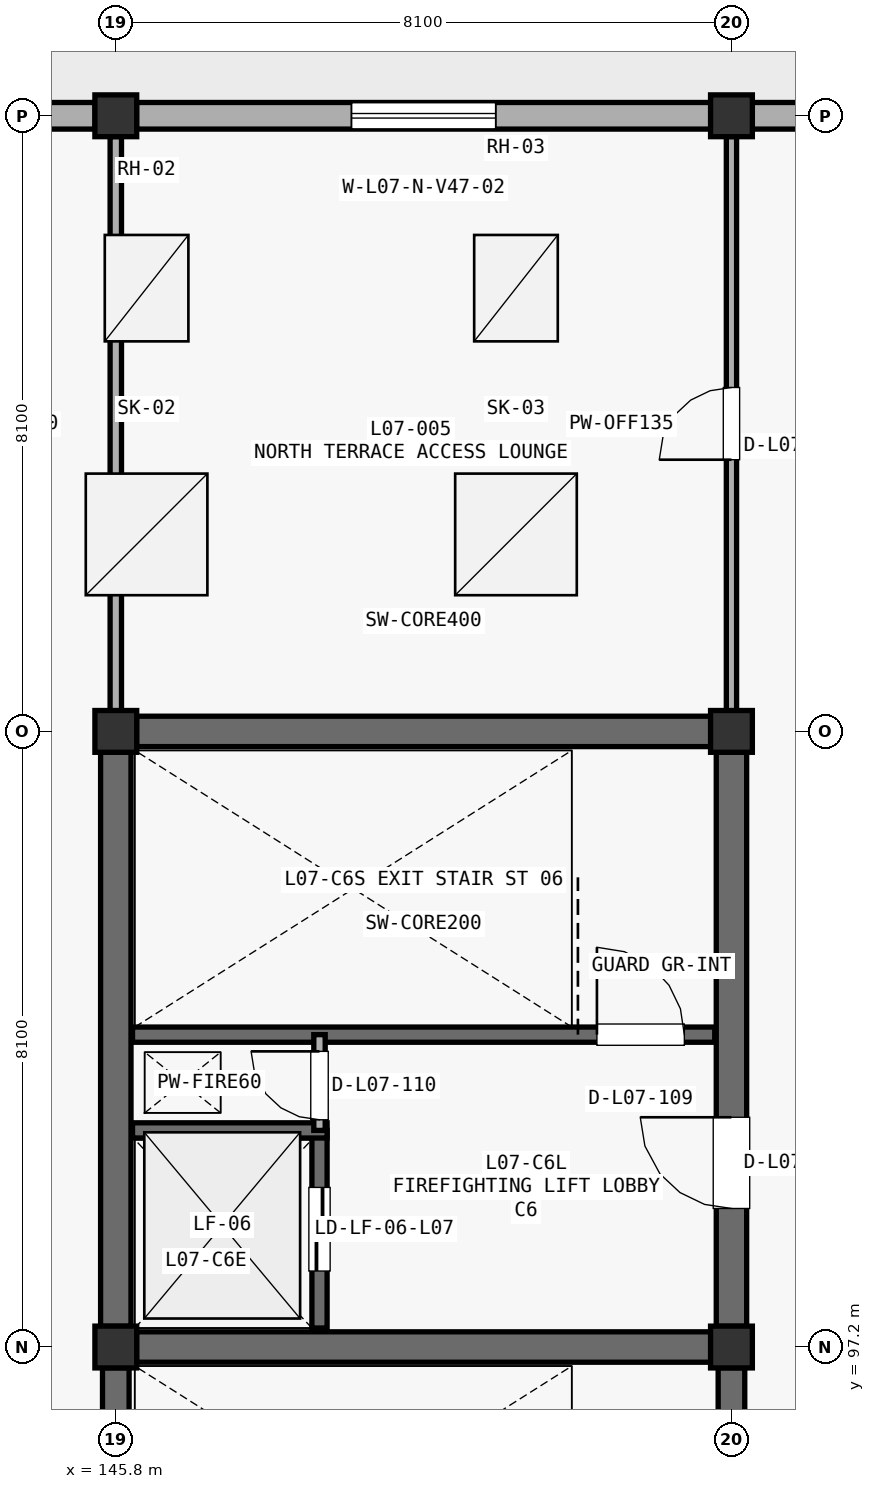
"""IFC4 building model, lengths in metres.
Left out: names, types, materials, properties, quantities, classifications, styles, units other than length and angle.
Written with IfcOpenShell. Run it as: python <this file> out.ifc"""

import sys

from ifc_helpers import new_model, si_unit, direction, frame, frame_2d, origin, origin_2d, place, context, subcontext, project, spatial, rectangle, extrude, element, fill, save


model = new_model("IFC4")
c1 = context("Model", 3, precision=1e-05, world=origin(), true_north=direction((0.0, 1.0)))
c2 = subcontext(c1, "Body", "Model", "MODEL_VIEW")
j1 = project(units=[si_unit("LENGTHUNIT", "METRE"), si_unit("PLANEANGLEUNIT", "RADIAN")], contexts=[c1])
p1 = place(None, origin())
s1 = spatial("IfcSite", under=j1, at=p1, CompositionType="ELEMENT")
p2 = place(p1, origin())
s2 = spatial("IfcBuilding", under=s1, at=p2, CompositionType="ELEMENT")
p3 = place(p2, frame((0.0, 0.0, 31.79)))
s3 = spatial("IfcBuildingStorey", under=s2, at=p3, CompositionType="ELEMENT", Elevation=31.79)
for number, where, z_axis, x_axis in (
    (1, (145.8, 97.2, 0.0), (0.0, 0.0, 1.0), (1.0, 0.0, 0.0)),
    (2, (145.8, 105.3, 0.0), (0.0, 0.0, 1.0), (1.0, 0.0, 0.0)),
    (3, (145.8, 113.4, 0.0), (0.0, 0.0, 1.0), (1.0, 0.0, 0.0)),
    (4, (153.9, 97.2, 0.0), (0.0, 0.0, 1.0), (1.0, 0.0, 0.0)),
    (5, (153.9, 105.3, 0.0), (0.0, 0.0, 1.0), (1.0, 0.0, 0.0)),
    (6, (153.9, 113.4, 0.0), (0.0, 0.0, 1.0), (1.0, 0.0, 0.0)),
):
    element("IfcColumn", number, at=place(p3, frame(where, z_axis=z_axis, x_axis=x_axis)), inside=s3, PredefinedType="COLUMN", context=c2, shape_type="SweptSolid", body=[
        extrude(rectangle(XDim=0.55, YDim=0.55, at=origin_2d()), origin(), (0.0, 0.0, 1.0), 4.42),
    ])
p4 = place(p3, frame((137.973, 113.4, 0.0), z_axis=(0.0, 0.0, 1.0), x_axis=(1.0, 0.0, 0.0)))
e7 = element("IfcWall", 7, at=p4, inside=s3, PredefinedType="STANDARD", context=c2, shape_type="SweptSolid", body=[
    extrude(rectangle(XDim=7.554, YDim=0.35, at=frame_2d((3.777, 0.0))), origin(), (0.0, 0.0, 1.0), 3.212),
])
p5 = place(p4, frame((2.327, 0.0, 0.85)))
e8 = element("IfcOpeningElement", 8, at=p5, cuts=e7, PredefinedType="OPENING", context=c2, shape_type="SweptSolid", body=[
    extrude(rectangle(XDim=2.9, YDim=1.6, at=frame_2d((1.45, 0.8))), frame((0.0, 0.185, 0.0), z_axis=(0.0, -1.0, 0.0), x_axis=(1.0, 0.0, 0.0)), (0.0, 0.0, 1.0), 0.37),
])
p6 = place(p3, frame((146.073, 113.4, 0.0), z_axis=(0.0, 0.0, 1.0), x_axis=(1.0, 0.0, 0.0)))
e9 = element("IfcWall", 9, at=p6, inside=s3, PredefinedType="STANDARD", context=c2, shape_type="SweptSolid", body=[
    extrude(rectangle(XDim=7.554, YDim=0.35, at=frame_2d((3.777, 0.0))), origin(), (0.0, 0.0, 1.0), 3.412),
])
p7 = place(p6, frame((2.827, 0.0, 0.85)))
e10 = element("IfcOpeningElement", 10, at=p7, cuts=e9, PredefinedType="OPENING", context=c2, shape_type="SweptSolid", body=[
    extrude(rectangle(XDim=1.9, YDim=1.85, at=frame_2d((0.95, 0.925))), frame((0.0, 0.185, 0.0), z_axis=(0.0, -1.0, 0.0), x_axis=(1.0, 0.0, 0.0)), (0.0, 0.0, 1.0), 0.37),
])
p8 = place(p3, frame((154.173, 113.4, 0.0), z_axis=(0.0, 0.0, 1.0), x_axis=(1.0, 0.0, 0.0)))
e11 = element("IfcWall", 11, at=p8, inside=s3, PredefinedType="STANDARD", context=c2, shape_type="SweptSolid", body=[
    extrude(rectangle(XDim=7.554, YDim=0.35, at=frame_2d((3.777, 0.0))), origin(), (0.0, 0.0, 1.0), 3.512),
])
p9 = place(p8, frame((2.877, 0.0, 0.0)))
e12 = element("IfcOpeningElement", 12, at=p9, cuts=e11, PredefinedType="OPENING", context=c2, shape_type="SweptSolid", body=[
    extrude(rectangle(XDim=1.8, YDim=2.2, at=frame_2d((0.9, 1.1))), frame((0.0, 0.185, 0.0), z_axis=(0.0, -1.0, 0.0), x_axis=(1.0, 0.0, 0.0)), (0.0, 0.0, 1.0), 0.37),
])
p10 = place(p3, frame((146.073, 105.3, 0.0), z_axis=(0.0, 0.0, 1.0), x_axis=(1.0, 0.0, 0.0)))
e13 = element("IfcWall", 13, at=p10, inside=s3, PredefinedType="SHEAR", context=c2, shape_type="SweptSolid", body=[
    extrude(rectangle(XDim=7.554, YDim=0.4, at=frame_2d((3.777, 0.0))), origin(), (0.0, 0.0, 1.0), 4.162),
])
p11 = place(p3, frame((145.8, 97.473, 0.0), z_axis=(0.0, 0.0, 1.0), x_axis=(0.0, 1.0, 0.0)))
e14 = element("IfcWall", 14, at=p11, inside=s3, PredefinedType="SHEAR", context=c2, shape_type="SweptSolid", body=[
    extrude(rectangle(XDim=7.554, YDim=0.4, at=frame_2d((3.777, 0.0))), origin(), (0.0, 0.0, 1.0), 4.162),
])
p12 = place(p3, frame((153.9, 97.473, 0.0), z_axis=(0.0, 0.0, 1.0), x_axis=(0.0, 1.0, 0.0)))
e15 = element("IfcWall", 15, at=p12, inside=s3, PredefinedType="SHEAR", context=c2, shape_type="SweptSolid", body=[
    extrude(rectangle(XDim=7.554, YDim=0.4, at=frame_2d((3.777, 0.0))), origin(), (0.0, 0.0, 1.0), 4.162),
])
p13 = place(p12, frame((1.55, 0.0, 0.0)))
e16 = element("IfcOpeningElement", 16, at=p13, cuts=e15, PredefinedType="OPENING", context=c2, shape_type="SweptSolid", body=[
    extrude(rectangle(XDim=1.2, YDim=2.2, at=frame_2d((0.6, 1.1))), frame((0.0, 0.21, 0.0), z_axis=(0.0, -1.0, 0.0), x_axis=(1.0, 0.0, 0.0)), (0.0, 0.0, 1.0), 0.42),
])
p14 = place(p3, frame((146.073, 97.2, 0.0), z_axis=(0.0, 0.0, 1.0), x_axis=(1.0, 0.0, 0.0)))
e17 = element("IfcWall", 17, at=p14, inside=s3, PredefinedType="SHEAR", context=c2, shape_type="SweptSolid", body=[
    extrude(rectangle(XDim=7.554, YDim=0.4, at=frame_2d((3.777, 0.0))), origin(), (0.0, 0.0, 1.0), 4.162),
])
p15 = place(p3, frame((146.02, 101.31, 0.0), z_axis=(0.0, 0.0, 1.0), x_axis=(1.0, 0.0, 0.0)))
e18 = element("IfcWall", 18, at=p15, inside=s3, PredefinedType="SHEAR", context=c2, shape_type="SweptSolid", body=[
    extrude(rectangle(XDim=7.66, YDim=0.2, at=frame_2d((3.83, 0.0))), origin(), (0.0, 0.0, 1.0), 4.162),
])
p16 = place(p15, frame((6.11, 0.0, 0.0)))
e19 = element("IfcOpeningElement", 19, at=p16, cuts=e18, PredefinedType="OPENING", context=c2, shape_type="SweptSolid", body=[
    extrude(rectangle(XDim=1.15, YDim=2.2, at=frame_2d((0.575, 1.1))), frame((0.0, 0.11, 0.0), z_axis=(0.0, -1.0, 0.0), x_axis=(1.0, 0.0, 0.0)), (0.0, 0.0, 1.0), 0.22),
])
p17 = place(p3, frame((148.48, 97.45, 0.0), z_axis=(0.0, 0.0, 1.0), x_axis=(0.0, 1.0, 0.0)))
e20 = element("IfcWall", 20, at=p17, inside=s3, PredefinedType="SHEAR", context=c2, shape_type="SweptSolid", body=[
    extrude(rectangle(XDim=2.6, YDim=0.2, at=frame_2d((1.3, 0.0))), origin(), (0.0, 0.0, 1.0), 4.162),
])
p18 = place(p17, frame((0.75, 0.0, 0.0)))
e21 = element("IfcOpeningElement", 21, at=p18, cuts=e20, PredefinedType="OPENING", context=c2, shape_type="SweptSolid", body=[
    extrude(rectangle(XDim=1.1, YDim=2.2, at=frame_2d((0.55, 1.1))), frame((0.0, 0.11, 0.0), z_axis=(0.0, -1.0, 0.0), x_axis=(1.0, 0.0, 0.0)), (0.0, 0.0, 1.0), 0.22),
])
p19 = place(p3, frame((146.02, 100.05, 0.0), z_axis=(0.0, 0.0, 1.0), x_axis=(1.0, 0.0, 0.0)))
e22 = element("IfcWall", 22, at=p19, inside=s3, PredefinedType="SHEAR", context=c2, shape_type="SweptSolid", body=[
    extrude(rectangle(XDim=2.56, YDim=0.2, at=frame_2d((1.28, 0.0))), origin(), (0.0, 0.0, 1.0), 4.162),
])
p20 = place(p3, frame((148.48, 100.05, 0.0), z_axis=(0.0, 0.0, 1.0), x_axis=(0.0, 1.0, 0.0)))
e23 = element("IfcWall", 23, at=p20, inside=s3, PredefinedType="PARTITIONING", context=c2, shape_type="SweptSolid", body=[
    extrude(rectangle(XDim=1.26, YDim=0.15, at=frame_2d((0.63, 0.0))), origin(), (0.0, 0.0, 1.0), 4.162),
])
p21 = place(p20, frame((0.14, 0.0, 0.0)))
e24 = element("IfcOpeningElement", 24, at=p21, cuts=e23, PredefinedType="OPENING", context=c2, shape_type="SweptSolid", body=[
    extrude(rectangle(XDim=0.9, YDim=2.15, at=frame_2d((0.45, 1.075))), frame((0.0, 0.085, 0.0), z_axis=(0.0, -1.0, 0.0), x_axis=(1.0, 0.0, 0.0)), (0.0, 0.0, 1.0), 0.17),
])
p22 = place(p3, frame((145.8, 89.373, 0.0), z_axis=(0.0, 0.0, 1.0), x_axis=(0.0, 1.0, 0.0)))
e25 = element("IfcWall", 25, at=p22, inside=s3, PredefinedType="SHEAR", context=c2, shape_type="SweptSolid", body=[
    extrude(rectangle(XDim=7.554, YDim=0.35, at=frame_2d((3.777, 0.0))), origin(), (0.0, 0.0, 1.0), 4.162),
])
p23 = place(p3, frame((153.9, 89.373, 0.0), z_axis=(0.0, 0.0, 1.0), x_axis=(0.0, 1.0, 0.0)))
e26 = element("IfcWall", 26, at=p23, inside=s3, PredefinedType="SHEAR", context=c2, shape_type="SweptSolid", body=[
    extrude(rectangle(XDim=7.554, YDim=0.35, at=frame_2d((3.777, 0.0))), origin(), (0.0, 0.0, 1.0), 4.162),
])
p24 = place(p23, frame((1.55, 0.0, 0.0)))
e27 = element("IfcOpeningElement", 27, at=p24, cuts=e26, PredefinedType="OPENING", context=c2, shape_type="SweptSolid", body=[
    extrude(rectangle(XDim=1.2, YDim=2.2, at=frame_2d((0.6, 1.1))), frame((0.0, 0.185, 0.0), z_axis=(0.0, -1.0, 0.0), x_axis=(1.0, 0.0, 0.0)), (0.0, 0.0, 1.0), 0.37),
])
p25 = place(p3, frame((145.8, 105.573, 0.0), z_axis=(0.0, 0.0, 1.0), x_axis=(0.0, 1.0, 0.0)))
e28 = element("IfcWall", 28, at=p25, inside=s3, PredefinedType="PARTITIONING", context=c2, shape_type="SweptSolid", body=[
    extrude(rectangle(XDim=7.554, YDim=0.15, at=frame_2d((3.777, 0.0))), origin(), (0.0, 0.0, 1.0), 3.562),
])
p26 = place(p3, frame((153.9, 105.573, 0.0), z_axis=(0.0, 0.0, 1.0), x_axis=(0.0, 1.0, 0.0)))
e29 = element("IfcWall", 29, at=p26, inside=s3, PredefinedType="PARTITIONING", context=c2, shape_type="SweptSolid", body=[
    extrude(rectangle(XDim=7.554, YDim=0.135, at=frame_2d((3.777, 0.0))), origin(), (0.0, 0.0, 1.0), 3.212),
])
p27 = place(p26, frame((3.302, 0.0, 0.0)))
e30 = element("IfcOpeningElement", 30, at=p27, cuts=e29, PredefinedType="OPENING", context=c2, shape_type="SweptSolid", body=[
    extrude(rectangle(XDim=0.95, YDim=2.15, at=frame_2d((0.475, 1.075))), frame((0.0, 0.078, 0.0), z_axis=(0.0, -1.0, 0.0), x_axis=(1.0, 0.0, 0.0)), (0.0, 0.0, 1.0), 0.155),
])
p28 = place(p7, origin())
e31 = element("IfcWindow", 31, at=p28, inside=s3, PartitioningType="SINGLE_PANEL", PredefinedType="WINDOW", context=c2, shape_type="SweptSolid", body=[
    extrude(rectangle(XDim=1.9, YDim=1.85, at=frame_2d((0.95, 0.925))), frame((0.0, 0.03, 0.0), z_axis=(0.0, -1.0, 0.0), x_axis=(1.0, 0.0, 0.0)), (0.0, 0.0, 1.0), 0.06),
])
fill(e10, e31)
p29 = place(p2, frame((0.0, 0.0, 36.21)))
p30 = place(p29, origin())
p31 = place(p30, frame((146.205, 107.892, 0.0)))
p32 = place(p31, frame((0.0, 0.0, 0.25)))
e32 = element("IfcWindow", 32, at=p32, inside=s3, PartitioningType="SINGLE_PANEL", PredefinedType="SKYLIGHT", context=c2, shape_type="SweptSolid", body=[
    extrude(rectangle(XDim=1.6, YDim=1.6, at=origin_2d()), origin(), (0.0, 0.0, 1.0), 0.05),
])
p33 = place(p30, frame((151.065, 107.892, 0.0)))
p34 = place(p33, frame((0.0, 0.0, 0.25)))
e33 = element("IfcWindow", 33, at=p34, inside=s3, PartitioningType="SINGLE_PANEL", PredefinedType="SKYLIGHT", context=c2, shape_type="SweptSolid", body=[
    extrude(rectangle(XDim=1.6, YDim=1.6, at=origin_2d()), origin(), (0.0, 0.0, 1.0), 0.05),
])
p35 = place(p30, frame((146.205, 111.132, 0.0)))
p36 = place(p35, frame((0.0, 0.0, 0.25)))
e34 = element("IfcWindow", 34, at=p36, inside=s3, PartitioningType="SINGLE_PANEL", PredefinedType="USERDEFINED", context=c2, shape_type="SweptSolid", body=[
    extrude(rectangle(XDim=1.1, YDim=1.4, at=origin_2d()), origin(), (0.0, 0.0, 1.0), 0.05),
])
p37 = place(p30, frame((151.065, 111.132, 0.0)))
p38 = place(p37, frame((0.0, 0.0, 0.25)))
e35 = element("IfcWindow", 35, at=p38, inside=s3, PartitioningType="SINGLE_PANEL", PredefinedType="USERDEFINED", context=c2, shape_type="SweptSolid", body=[
    extrude(rectangle(XDim=1.1, YDim=1.4, at=origin_2d()), origin(), (0.0, 0.0, 1.0), 0.05),
])
p39 = place(p13, origin())
e36 = element("IfcDoor", 36, at=p39, inside=s3, OperationType="SINGLE_SWING_RIGHT", PredefinedType="DOOR", context=c2, shape_type="SweptSolid", body=[
    extrude(rectangle(XDim=1.2, YDim=2.2, at=frame_2d((0.6, 1.1))), frame((0.0, 0.025, 0.0), z_axis=(0.0, -1.0, 0.0), x_axis=(1.0, 0.0, 0.0)), (0.0, 0.0, 1.0), 0.05),
])
fill(e16, e36)
p40 = place(p16, origin())
e37 = element("IfcDoor", 37, at=p40, inside=s3, OperationType="SINGLE_SWING_LEFT", PredefinedType="DOOR", context=c2, shape_type="SweptSolid", body=[
    extrude(rectangle(XDim=1.15, YDim=2.2, at=frame_2d((0.575, 1.1))), frame((0.0, 0.025, 0.0), z_axis=(0.0, -1.0, 0.0), x_axis=(1.0, 0.0, 0.0)), (0.0, 0.0, 1.0), 0.05),
])
fill(e19, e37)
p41 = place(p18, origin())
e38 = element("IfcDoor", 38, at=p41, inside=s3, OperationType="SLIDING_TO_LEFT", PredefinedType="DOOR", context=c2, shape_type="SweptSolid", body=[
    extrude(rectangle(XDim=1.1, YDim=2.2, at=frame_2d((0.55, 1.1))), frame((0.0, 0.025, 0.0), z_axis=(0.0, -1.0, 0.0), x_axis=(1.0, 0.0, 0.0)), (0.0, 0.0, 1.0), 0.05),
])
fill(e21, e38)
p42 = place(p21, origin())
e39 = element("IfcDoor", 39, at=p42, inside=s3, OperationType="SINGLE_SWING_RIGHT", PredefinedType="DOOR", context=c2, shape_type="SweptSolid", body=[
    extrude(rectangle(XDim=0.9, YDim=2.15, at=frame_2d((0.45, 1.075))), frame((0.0, 0.025, 0.0), z_axis=(0.0, -1.0, 0.0), x_axis=(1.0, 0.0, 0.0)), (0.0, 0.0, 1.0), 0.05),
])
fill(e24, e39)
p43 = place(p27, origin())
e40 = element("IfcDoor", 40, at=p43, inside=s3, OperationType="SINGLE_SWING_LEFT", PredefinedType="DOOR", context=c2, shape_type="SweptSolid", body=[
    extrude(rectangle(XDim=0.95, YDim=2.15, at=frame_2d((0.475, 1.075))), frame((0.0, 0.025, 0.0), z_axis=(0.0, -1.0, 0.0), x_axis=(1.0, 0.0, 0.0)), (0.0, 0.0, 1.0), 0.05),
])
fill(e30, e40)
save(model, sys.argv[1])
